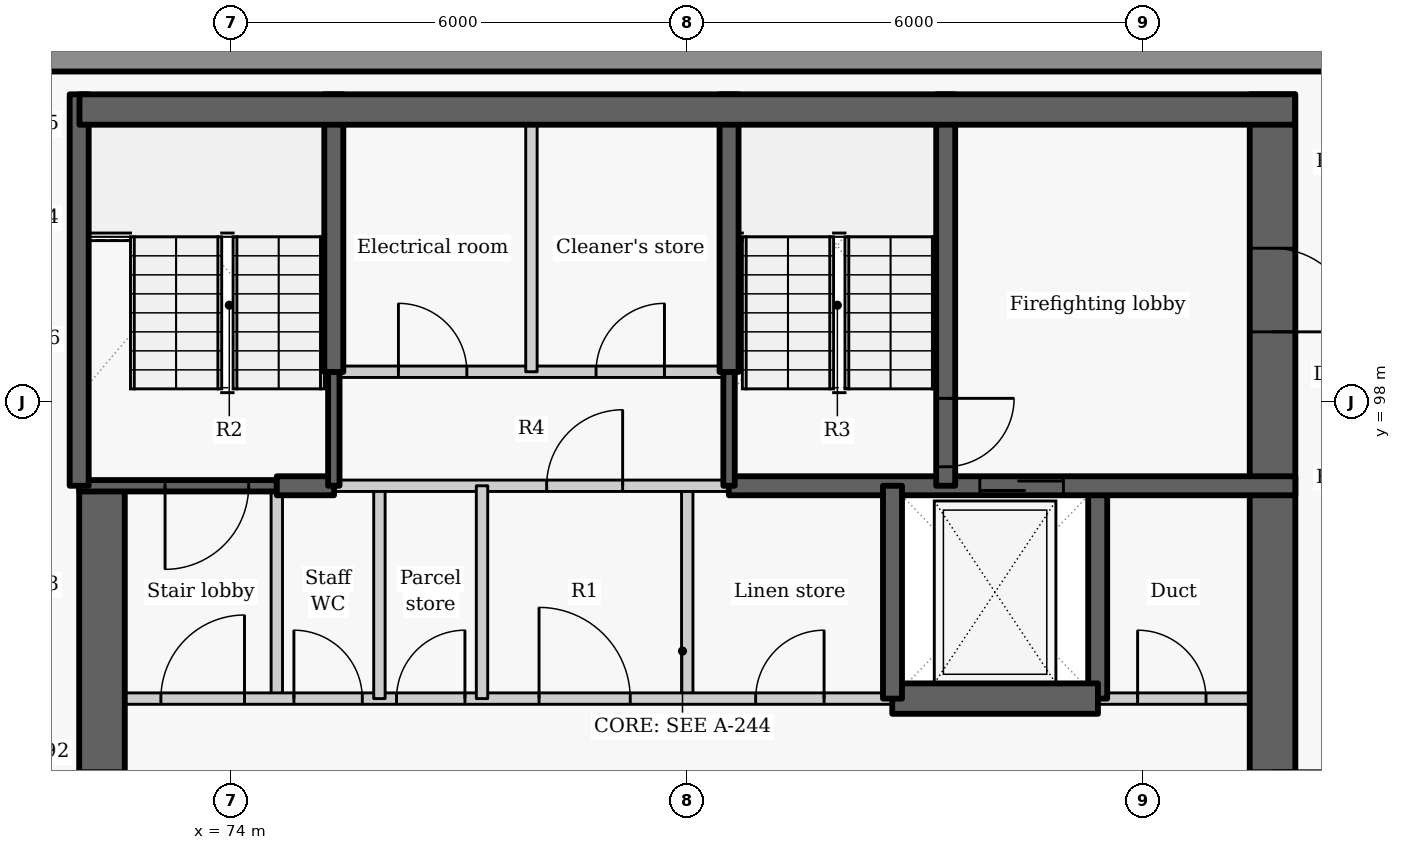
"""IFC4 building model, lengths in metres.
Left out: names, types, materials, properties, quantities, classifications, styles, units other than length and angle.
Written with IfcOpenShell. Run it as: python <this file> out.ifc"""

import sys

from ifc_helpers import new_model, si_unit, direction, frame, frame_2d, origin, place, context, subcontext, project, spatial, rectangle, extrude, element, fill, save


model = new_model("IFC4")
c1 = context("Model", 3, precision=1e-05, world=origin(), true_north=direction((0.0, 1.0)))
c2 = subcontext(c1, "Body", "Model", "MODEL_VIEW")
j1 = project(units=[si_unit("LENGTHUNIT", "METRE"), si_unit("PLANEANGLEUNIT", "RADIAN")], contexts=[c1])
p1 = place(None, origin())
s1 = spatial("IfcSite", under=j1, at=p1, CompositionType="ELEMENT")
p2 = place(p1, origin())
s2 = spatial("IfcBuilding", under=s1, at=p2, CompositionType="ELEMENT")
p3 = place(p2, frame((0.0, 0.0, 269.1)))
s3 = spatial("IfcBuildingStorey", under=s2, at=p3, CompositionType="ELEMENT", Elevation=269.1)
p4 = place(p3, frame((89.499, 102.5, 0.0), z_axis=(0.0, 0.0, 1.0), x_axis=(-1.0, 0.0, 0.0)))
e1 = element("IfcWall", 1, at=p4, inside=s3, PredefinedType="SOLIDWALL", context=c2, shape_type="SweptSolid", body=[
    extrude(rectangle(XDim=19.033, YDim=0.3, at=frame_2d((9.517, 0.0))), origin(), (0.0, 0.0, 1.0), 2.125),
])
p5 = place(p3, frame((74.6, 94.1, 0.0), z_axis=(0.0, 0.0, 1.0), x_axis=(0.0, 1.0, 0.0)))
e2 = element("IfcWall", 2, at=p5, inside=s3, PredefinedType="PARTITIONING", context=c2, shape_type="SweptSolid", body=[
    extrude(rectangle(XDim=2.8, YDim=0.15, at=frame_2d((1.4, 0.0))), origin(), (0.0, 0.0, 1.0), 3.025),
])
p6 = place(p3, frame((72.3, 87.8, -0.275), z_axis=(0.0, 0.0, 1.0), x_axis=(0.0, 1.0, 0.0)))
e3 = element("IfcWall", 3, at=p6, inside=s3, PredefinedType="SHEAR", context=c2, shape_type="SweptSolid", body=[
    extrude(rectangle(XDim=9.1, YDim=0.6, at=frame_2d((4.55, 0.0))), origin(), (0.0, 0.0, 1.0), 3.3),
])
p7 = place(p6, frame((3.85, 0.0, 0.275)))
e4 = element("IfcOpeningElement", 4, at=p7, cuts=e3, PredefinedType="OPENING", context=c2, shape_type="SweptSolid", body=[
    extrude(rectangle(XDim=1.5, YDim=2.1, at=frame_2d((0.75, 1.05))), frame((0.0, 0.31, 0.0), z_axis=(0.0, -1.0, 0.0), x_axis=(1.0, 0.0, 0.0)), (0.0, 0.0, 1.0), 0.62),
])
p8 = place(p3, frame((85.4, 94.1, -0.275), z_axis=(0.0, 0.0, 1.0), x_axis=(0.0, 1.0, 0.0)))
e5 = element("IfcWall", 5, at=p8, inside=s3, PredefinedType="SHEAR", context=c2, shape_type="SweptSolid", body=[
    extrude(rectangle(XDim=2.8, YDim=0.25, at=frame_2d((1.4, 0.0))), origin(), (0.0, 0.0, 1.0), 3.3),
])
p9 = place(p3, frame((87.7, 102.05, -0.275), z_axis=(0.0, 0.0, 1.0), x_axis=(0.0, -1.0, 0.0)))
e6 = element("IfcWall", 6, at=p9, inside=s3, PredefinedType="SHEAR", context=c2, shape_type="SweptSolid", body=[
    extrude(rectangle(XDim=14.25, YDim=0.6, at=frame_2d((7.125, 0.0))), origin(), (0.0, 0.0, 1.0), 3.3),
])
p10 = place(p9, frame((8.9, 0.0, 0.275)))
e7 = element("IfcOpeningElement", 7, at=p10, cuts=e6, PredefinedType="OPENING", context=c2, shape_type="SweptSolid", body=[
    extrude(rectangle(XDim=1.5, YDim=2.1, at=frame_2d((0.75, 1.05))), frame((0.0, 0.31, 0.0), z_axis=(0.0, -1.0, 0.0), x_axis=(1.0, 0.0, 0.0)), (0.0, 0.0, 1.0), 0.62),
])
p11 = place(p9, frame((2.025, 0.0, 0.275)))
e8 = element("IfcOpeningElement", 8, at=p11, cuts=e6, PredefinedType="OPENING", context=c2, shape_type="SweptSolid", body=[
    extrude(rectangle(XDim=1.1, YDim=2.1, at=frame_2d((0.55, 1.05))), frame((0.0, 0.31, 0.0), z_axis=(0.0, -1.0, 0.0), x_axis=(1.0, 0.0, 0.0)), (0.0, 0.0, 1.0), 0.62),
])
p12 = place(p3, frame((80.0, 94.1, 0.0), z_axis=(0.0, 0.0, 1.0), x_axis=(0.0, 1.0, 0.0)))
e9 = element("IfcWall", 9, at=p12, inside=s3, PredefinedType="PARTITIONING", context=c2, shape_type="SweptSolid", body=[
    extrude(rectangle(XDim=2.8, YDim=0.15, at=frame_2d((1.4, 0.0))), origin(), (0.0, 0.0, 1.0), 3.025),
])
p13 = place(p3, frame((72.0, 94.1, 0.0), z_axis=(0.0, 0.0, 1.0), x_axis=(1.0, 0.0, 0.0)))
e10 = element("IfcWall", 10, at=p13, inside=s3, PredefinedType="PARTITIONING", context=c2, shape_type="SweptSolid", body=[
    extrude(rectangle(XDim=10.703, YDim=0.15, at=frame_2d((5.352, 0.0))), origin(), (0.0, 0.0, 1.0), 3.025),
])
p14 = place(p13, frame((1.075, 0.0, 0.0)))
e11 = element("IfcOpeningElement", 11, at=p14, cuts=e10, PredefinedType="OPENING", context=c2, shape_type="SweptSolid", body=[
    extrude(rectangle(XDim=1.1, YDim=2.1, at=frame_2d((0.55, 1.05))), frame((0.0, 0.085, 0.0), z_axis=(0.0, -1.0, 0.0), x_axis=(1.0, 0.0, 0.0)), (0.0, 0.0, 1.0), 0.17),
])
p15 = place(p13, frame((2.825, 0.0, 0.0)))
e12 = element("IfcOpeningElement", 12, at=p15, cuts=e10, PredefinedType="OPENING", context=c2, shape_type="SweptSolid", body=[
    extrude(rectangle(XDim=0.9, YDim=2.1, at=frame_2d((0.45, 1.05))), frame((0.0, 0.085, 0.0), z_axis=(0.0, -1.0, 0.0), x_axis=(1.0, 0.0, 0.0)), (0.0, 0.0, 1.0), 0.17),
])
p16 = place(p13, frame((4.175, 0.0, 0.0)))
e13 = element("IfcOpeningElement", 13, at=p16, cuts=e10, PredefinedType="OPENING", context=c2, shape_type="SweptSolid", body=[
    extrude(rectangle(XDim=0.9, YDim=2.1, at=frame_2d((0.45, 1.05))), frame((0.0, 0.085, 0.0), z_axis=(0.0, -1.0, 0.0), x_axis=(1.0, 0.0, 0.0)), (0.0, 0.0, 1.0), 0.17),
])
p17 = place(p13, frame((6.05, 0.0, 0.0)))
e14 = element("IfcOpeningElement", 14, at=p17, cuts=e10, PredefinedType="OPENING", context=c2, shape_type="SweptSolid", body=[
    extrude(rectangle(XDim=1.2, YDim=2.1, at=frame_2d((0.6, 1.05))), frame((0.0, 0.085, 0.0), z_axis=(0.0, -1.0, 0.0), x_axis=(1.0, 0.0, 0.0)), (0.0, 0.0, 1.0), 0.17),
])
p18 = place(p13, frame((8.9, 0.0, 0.0)))
e15 = element("IfcOpeningElement", 15, at=p18, cuts=e10, PredefinedType="OPENING", context=c2, shape_type="SweptSolid", body=[
    extrude(rectangle(XDim=0.9, YDim=2.1, at=frame_2d((0.45, 1.05))), frame((0.0, 0.085, 0.0), z_axis=(0.0, -1.0, 0.0), x_axis=(1.0, 0.0, 0.0)), (0.0, 0.0, 1.0), 0.17),
])
p19 = place(p3, frame((85.397, 94.1, 0.0), z_axis=(0.0, 0.0, 1.0), x_axis=(1.0, 0.0, 0.0)))
e16 = element("IfcWall", 16, at=p19, inside=s3, PredefinedType="PARTITIONING", context=c2, shape_type="SweptSolid", body=[
    extrude(rectangle(XDim=2.603, YDim=0.15, at=frame_2d((1.302, 0.0))), origin(), (0.0, 0.0, 1.0), 3.025),
])
p20 = place(p19, frame((0.528, 0.0, 0.0)))
e17 = element("IfcOpeningElement", 17, at=p20, cuts=e16, PredefinedType="OPENING", context=c2, shape_type="SweptSolid", body=[
    extrude(rectangle(XDim=0.9, YDim=2.1, at=frame_2d((0.45, 1.05))), frame((0.0, 0.085, 0.0), z_axis=(0.0, -1.0, 0.0), x_axis=(1.0, 0.0, 0.0)), (0.0, 0.0, 1.0), 0.17),
])
p21 = place(p3, frame((82.697, 94.1, -0.275), z_axis=(0.0, 0.0, 1.0), x_axis=(1.0, 0.0, 0.0)))
e18 = element("IfcWall", 18, at=p21, inside=s3, PredefinedType="SHEAR", context=c2, shape_type="SweptSolid", body=[
    extrude(rectangle(XDim=2.706, YDim=0.4, at=frame_2d((1.353, 0.0))), origin(), (0.0, 0.0, 1.0), 3.3),
])
p22 = place(p3, frame((74.6, 96.9, -0.275), z_axis=(0.0, 0.0, 1.0), x_axis=(-1.0, 0.0, 0.0)))
e19 = element("IfcWall", 19, at=p22, inside=s3, PredefinedType="SHEAR", context=c2, shape_type="SweptSolid", body=[
    extrude(rectangle(XDim=2.6, YDim=0.15, at=frame_2d((1.3, 0.0))), origin(), (0.0, 0.0, 1.0), 3.3),
])
p23 = place(p22, frame((0.37, 0.0, 0.275)))
e20 = element("IfcOpeningElement", 20, at=p23, cuts=e19, PredefinedType="OPENING", context=c2, shape_type="SweptSolid", body=[
    extrude(rectangle(XDim=1.1, YDim=2.1, at=frame_2d((0.55, 1.05))), frame((0.0, 0.085, 0.0), z_axis=(0.0, -1.0, 0.0), x_axis=(1.0, 0.0, 0.0)), (0.0, 0.0, 1.0), 0.17),
])
p24 = place(p3, frame((75.95, 94.1, 0.0), z_axis=(0.0, 0.0, 1.0), x_axis=(0.0, 1.0, 0.0)))
e21 = element("IfcWall", 21, at=p24, inside=s3, PredefinedType="PARTITIONING", context=c2, shape_type="SweptSolid", body=[
    extrude(rectangle(XDim=2.8, YDim=0.15, at=frame_2d((1.4, 0.0))), origin(), (0.0, 0.0, 1.0), 3.025),
])
p25 = place(p3, frame((74.6, 96.9, -0.275), z_axis=(0.0, 0.0, 1.0), x_axis=(1.0, 0.0, 0.0)))
e22 = element("IfcWall", 22, at=p25, inside=s3, PredefinedType="SHEAR", context=c2, shape_type="SweptSolid", body=[
    extrude(rectangle(XDim=0.753, YDim=0.25, at=frame_2d((0.376, 0.0))), origin(), (0.0, 0.0, 1.0), 3.3),
])
p26 = place(p3, frame((80.547, 96.9, -0.275), z_axis=(0.0, 0.0, 1.0), x_axis=(1.0, 0.0, 0.0)))
e23 = element("IfcWall", 23, at=p26, inside=s3, PredefinedType="SHEAR", context=c2, shape_type="SweptSolid", body=[
    extrude(rectangle(XDim=7.453, YDim=0.25, at=frame_2d((3.727, 0.0))), origin(), (0.0, 0.0, 1.0), 3.3),
])
p27 = place(p26, frame((3.302, 0.0, 0.275)))
e24 = element("IfcOpeningElement", 24, at=p27, cuts=e23, PredefinedType="OPENING", context=c2, shape_type="SweptSolid", body=[
    extrude(rectangle(XDim=1.1, YDim=2.1, at=frame_2d((0.55, 1.05))), frame((0.0, 0.135, 0.0), z_axis=(0.0, -1.0, 0.0), x_axis=(1.0, 0.0, 0.0)), (0.0, 0.0, 1.0), 0.27),
])
p28 = place(p3, frame((75.347, 96.9, 0.0), z_axis=(0.0, 0.0, 1.0), x_axis=(1.0, 0.0, 0.0)))
e25 = element("IfcWall", 25, at=p28, inside=s3, PredefinedType="PARTITIONING", context=c2, shape_type="SweptSolid", body=[
    extrude(rectangle(XDim=5.206, YDim=0.15, at=frame_2d((2.603, 0.0))), origin(), (0.0, 0.0, 1.0), 3.025),
])
p29 = place(p28, frame((2.803, 0.0, 0.0)))
e26 = element("IfcOpeningElement", 26, at=p29, cuts=e25, PredefinedType="OPENING", context=c2, shape_type="SweptSolid", body=[
    extrude(rectangle(XDim=1.0, YDim=2.1, at=frame_2d((0.5, 1.05))), frame((0.0, 0.085, 0.0), z_axis=(0.0, -1.0, 0.0), x_axis=(1.0, 0.0, 0.0)), (0.0, 0.0, 1.0), 0.17),
])
p30 = place(p3, frame((77.3, 94.1, 0.0), z_axis=(0.0, 0.0, 1.0), x_axis=(0.0, 1.0, 0.0)))
e27 = element("IfcWall", 27, at=p30, inside=s3, PredefinedType="PARTITIONING", context=c2, shape_type="SweptSolid", body=[
    extrude(rectangle(XDim=2.8, YDim=0.15, at=frame_2d((1.4, 0.0))), origin(), (0.0, 0.0, 1.0), 3.025),
])
p31 = place(p3, frame((82.7, 94.1, -0.275), z_axis=(0.0, 0.0, 1.0), x_axis=(0.0, 1.0, 0.0)))
e28 = element("IfcWall", 28, at=p31, inside=s3, PredefinedType="SHEAR", context=c2, shape_type="SweptSolid", body=[
    extrude(rectangle(XDim=2.8, YDim=0.25, at=frame_2d((1.4, 0.0))), origin(), (0.0, 0.0, 1.0), 3.3),
])
p32 = place(p3, frame((75.35, 96.9, -0.275), z_axis=(0.0, 0.0, 1.0), x_axis=(0.0, 1.0, 0.0)))
e29 = element("IfcWall", 29, at=p32, inside=s3, PredefinedType="SHEAR", context=c2, shape_type="SweptSolid", body=[
    extrude(rectangle(XDim=1.503, YDim=0.15, at=frame_2d((0.751, 0.0))), origin(), (0.0, 0.0, 1.0), 3.3),
])
p33 = place(p3, frame((75.35, 98.397, -0.275), z_axis=(0.0, 0.0, 1.0), x_axis=(0.0, 1.0, 0.0)))
e30 = element("IfcWall", 30, at=p33, inside=s3, PredefinedType="SHEAR", context=c2, shape_type="SweptSolid", body=[
    extrude(rectangle(XDim=3.653, YDim=0.25, at=frame_2d((1.827, 0.0))), origin(), (0.0, 0.0, 1.0), 3.3),
])
p34 = place(p3, frame((72.0, 96.9, -0.275), z_axis=(0.0, 0.0, 1.0), x_axis=(0.0, 1.0, 0.0)))
e31 = element("IfcWall", 31, at=p34, inside=s3, PredefinedType="SHEAR", context=c2, shape_type="SweptSolid", body=[
    extrude(rectangle(XDim=5.15, YDim=0.25, at=frame_2d((2.575, 0.0))), origin(), (0.0, 0.0, 1.0), 3.3),
])
p35 = place(p3, frame((83.4, 102.05, -0.275), z_axis=(0.0, 0.0, 1.0), x_axis=(0.0, -1.0, 0.0)))
e32 = element("IfcWall", 32, at=p35, inside=s3, PredefinedType="SHEAR", context=c2, shape_type="SweptSolid", body=[
    extrude(rectangle(XDim=5.15, YDim=0.25, at=frame_2d((2.575, 0.0))), origin(), (0.0, 0.0, 1.0), 3.3),
])
p36 = place(p35, frame((4.0, 0.0, 0.275)))
e33 = element("IfcOpeningElement", 33, at=p36, cuts=e32, PredefinedType="OPENING", context=c2, shape_type="SweptSolid", body=[
    extrude(rectangle(XDim=0.9, YDim=2.1, at=frame_2d((0.45, 1.05))), frame((0.0, 0.135, 0.0), z_axis=(0.0, -1.0, 0.0), x_axis=(1.0, 0.0, 0.0)), (0.0, 0.0, 1.0), 0.27),
])
p37 = place(p3, frame((80.55, 96.9, -0.275), z_axis=(0.0, 0.0, 1.0), x_axis=(0.0, 1.0, 0.0)))
e34 = element("IfcWall", 34, at=p37, inside=s3, PredefinedType="SHEAR", context=c2, shape_type="SweptSolid", body=[
    extrude(rectangle(XDim=1.503, YDim=0.15, at=frame_2d((0.751, 0.0))), origin(), (0.0, 0.0, 1.0), 3.3),
])
p38 = place(p3, frame((80.55, 98.397, -0.275), z_axis=(0.0, 0.0, 1.0), x_axis=(0.0, 1.0, 0.0)))
e35 = element("IfcWall", 35, at=p38, inside=s3, PredefinedType="SHEAR", context=c2, shape_type="SweptSolid", body=[
    extrude(rectangle(XDim=3.653, YDim=0.25, at=frame_2d((1.827, 0.0))), origin(), (0.0, 0.0, 1.0), 3.3),
])
p39 = place(p3, frame((75.35, 98.4, 0.0), z_axis=(0.0, 0.0, 1.0), x_axis=(1.0, 0.0, 0.0)))
e36 = element("IfcWall", 36, at=p39, inside=s3, PredefinedType="PARTITIONING", context=c2, shape_type="SweptSolid", body=[
    extrude(rectangle(XDim=5.2, YDim=0.15, at=frame_2d((2.6, 0.0))), origin(), (0.0, 0.0, 1.0), 3.025),
])
p40 = place(p39, frame((0.85, 0.0, 0.0)))
e37 = element("IfcOpeningElement", 37, at=p40, cuts=e36, PredefinedType="OPENING", context=c2, shape_type="SweptSolid", body=[
    extrude(rectangle(XDim=0.9, YDim=2.1, at=frame_2d((0.45, 1.05))), frame((0.0, 0.085, 0.0), z_axis=(0.0, -1.0, 0.0), x_axis=(1.0, 0.0, 0.0)), (0.0, 0.0, 1.0), 0.17),
])
p41 = place(p39, frame((3.45, 0.0, 0.0)))
e38 = element("IfcOpeningElement", 38, at=p41, cuts=e36, PredefinedType="OPENING", context=c2, shape_type="SweptSolid", body=[
    extrude(rectangle(XDim=0.9, YDim=2.1, at=frame_2d((0.45, 1.05))), frame((0.0, 0.085, 0.0), z_axis=(0.0, -1.0, 0.0), x_axis=(1.0, 0.0, 0.0)), (0.0, 0.0, 1.0), 0.17),
])
p42 = place(p3, frame((77.95, 98.4, 0.0), z_axis=(0.0, 0.0, 1.0), x_axis=(0.0, 1.0, 0.0)))
e39 = element("IfcWall", 39, at=p42, inside=s3, PredefinedType="PARTITIONING", context=c2, shape_type="SweptSolid", body=[
    extrude(rectangle(XDim=3.65, YDim=0.15, at=frame_2d((1.825, 0.0))), origin(), (0.0, 0.0, 1.0), 3.025),
])
p43 = place(p3, frame((72.004, 101.85, -0.275), z_axis=(0.0, 0.0, 1.0), x_axis=(1.0, 0.0, 0.0)))
e40 = element("IfcWall", 40, at=p43, inside=s3, PredefinedType="SHEAR", context=c2, shape_type="SweptSolid", body=[
    extrude(rectangle(XDim=15.992, YDim=0.4, at=frame_2d((7.996, 0.0))), origin(), (0.0, 0.0, 1.0), 3.3),
])
p44 = place(p14, origin())
e41 = element("IfcDoor", 41, at=p44, inside=s3, OperationType="SINGLE_SWING_RIGHT", PredefinedType="DOOR", context=c2, shape_type="SweptSolid", body=[
    extrude(rectangle(XDim=1.1, YDim=2.1, at=frame_2d((0.55, 1.05))), frame((0.0, 0.025, 0.0), z_axis=(0.0, -1.0, 0.0), x_axis=(1.0, 0.0, 0.0)), (0.0, 0.0, 1.0), 0.05),
])
fill(e11, e41)
p45 = place(p15, origin())
e42 = element("IfcDoor", 42, at=p45, inside=s3, OperationType="SINGLE_SWING_LEFT", PredefinedType="DOOR", context=c2, shape_type="SweptSolid", body=[
    extrude(rectangle(XDim=0.9, YDim=2.1, at=frame_2d((0.45, 1.05))), frame((0.0, 0.025, 0.0), z_axis=(0.0, -1.0, 0.0), x_axis=(1.0, 0.0, 0.0)), (0.0, 0.0, 1.0), 0.05),
])
fill(e12, e42)
p46 = place(p16, origin())
e43 = element("IfcDoor", 43, at=p46, inside=s3, OperationType="SINGLE_SWING_RIGHT", PredefinedType="DOOR", context=c2, shape_type="SweptSolid", body=[
    extrude(rectangle(XDim=0.9, YDim=2.1, at=frame_2d((0.45, 1.05))), frame((0.0, 0.025, 0.0), z_axis=(0.0, -1.0, 0.0), x_axis=(1.0, 0.0, 0.0)), (0.0, 0.0, 1.0), 0.05),
])
fill(e13, e43)
p47 = place(p17, origin())
e44 = element("IfcDoor", 44, at=p47, inside=s3, OperationType="DOUBLE_DOOR_SINGLE_SWING", PredefinedType="DOOR", context=c2, shape_type="SweptSolid", body=[
    extrude(rectangle(XDim=1.2, YDim=2.1, at=frame_2d((0.6, 1.05))), frame((0.0, 0.025, 0.0), z_axis=(0.0, -1.0, 0.0), x_axis=(1.0, 0.0, 0.0)), (0.0, 0.0, 1.0), 0.05),
])
fill(e14, e44)
p48 = place(p18, origin())
e45 = element("IfcDoor", 45, at=p48, inside=s3, OperationType="SINGLE_SWING_RIGHT", PredefinedType="DOOR", context=c2, shape_type="SweptSolid", body=[
    extrude(rectangle(XDim=0.9, YDim=2.1, at=frame_2d((0.45, 1.05))), frame((0.0, 0.025, 0.0), z_axis=(0.0, -1.0, 0.0), x_axis=(1.0, 0.0, 0.0)), (0.0, 0.0, 1.0), 0.05),
])
fill(e15, e45)
p49 = place(p27, origin())
e46 = element("IfcDoor", 46, at=p49, inside=s3, OperationType="SLIDING_TO_LEFT", PredefinedType="DOOR", context=c2, shape_type="SweptSolid", body=[
    extrude(rectangle(XDim=1.1, YDim=2.1, at=frame_2d((0.55, 1.05))), frame((0.0, 0.025, 0.0), z_axis=(0.0, -1.0, 0.0), x_axis=(1.0, 0.0, 0.0)), (0.0, 0.0, 1.0), 0.05),
])
fill(e24, e46)
p50 = place(p20, origin())
e47 = element("IfcDoor", 47, at=p50, inside=s3, OperationType="SINGLE_SWING_LEFT", PredefinedType="DOOR", context=c2, shape_type="SweptSolid", body=[
    extrude(rectangle(XDim=0.9, YDim=2.1, at=frame_2d((0.45, 1.05))), frame((0.0, 0.025, 0.0), z_axis=(0.0, -1.0, 0.0), x_axis=(1.0, 0.0, 0.0)), (0.0, 0.0, 1.0), 0.05),
])
fill(e17, e47)
p51 = place(p29, origin())
e48 = element("IfcDoor", 48, at=p51, inside=s3, OperationType="SINGLE_SWING_RIGHT", PredefinedType="DOOR", context=c2, shape_type="SweptSolid", body=[
    extrude(rectangle(XDim=1.0, YDim=2.1, at=frame_2d((0.5, 1.05))), frame((0.0, 0.025, 0.0), z_axis=(0.0, -1.0, 0.0), x_axis=(1.0, 0.0, 0.0)), (0.0, 0.0, 1.0), 0.05),
])
fill(e26, e48)
p52 = place(p40, origin())
e49 = element("IfcDoor", 49, at=p52, inside=s3, OperationType="SINGLE_SWING_LEFT", PredefinedType="DOOR", context=c2, shape_type="SweptSolid", body=[
    extrude(rectangle(XDim=0.9, YDim=2.1, at=frame_2d((0.45, 1.05))), frame((0.0, 0.025, 0.0), z_axis=(0.0, -1.0, 0.0), x_axis=(1.0, 0.0, 0.0)), (0.0, 0.0, 1.0), 0.05),
])
fill(e37, e49)
p53 = place(p41, origin())
e50 = element("IfcDoor", 50, at=p53, inside=s3, OperationType="SINGLE_SWING_RIGHT", PredefinedType="DOOR", context=c2, shape_type="SweptSolid", body=[
    extrude(rectangle(XDim=0.9, YDim=2.1, at=frame_2d((0.45, 1.05))), frame((0.0, 0.025, 0.0), z_axis=(0.0, -1.0, 0.0), x_axis=(1.0, 0.0, 0.0)), (0.0, 0.0, 1.0), 0.05),
])
fill(e38, e50)
p54 = place(p23, origin())
e51 = element("IfcDoor", 51, at=p54, inside=s3, OperationType="SINGLE_SWING_RIGHT", PredefinedType="DOOR", context=c2, shape_type="SweptSolid", body=[
    extrude(rectangle(XDim=1.1, YDim=2.1, at=frame_2d((0.55, 1.05))), frame((0.0, 0.025, 0.0), z_axis=(0.0, -1.0, 0.0), x_axis=(1.0, 0.0, 0.0)), (0.0, 0.0, 1.0), 0.05),
])
fill(e20, e51)
p55 = place(p36, origin())
e52 = element("IfcDoor", 52, at=p55, inside=s3, OperationType="SINGLE_SWING_LEFT", PredefinedType="DOOR", context=c2, shape_type="SweptSolid", body=[
    extrude(rectangle(XDim=0.9, YDim=2.1, at=frame_2d((0.45, 1.05))), frame((0.0, 0.025, 0.0), z_axis=(0.0, -1.0, 0.0), x_axis=(1.0, 0.0, 0.0)), (0.0, 0.0, 1.0), 0.05),
])
fill(e33, e52)
p56 = place(p10, origin())
e53 = element("IfcDoor", 53, at=p56, inside=s3, OperationType="DOUBLE_DOOR_SINGLE_SWING", PredefinedType="DOOR", context=c2, shape_type="SweptSolid", body=[
    extrude(rectangle(XDim=1.5, YDim=2.1, at=frame_2d((0.75, 1.05))), frame((0.0, 0.025, 0.0), z_axis=(0.0, -1.0, 0.0), x_axis=(1.0, 0.0, 0.0)), (0.0, 0.0, 1.0), 0.05),
])
fill(e7, e53)
p57 = place(p7, origin())
e54 = element("IfcDoor", 54, at=p57, inside=s3, OperationType="DOUBLE_DOOR_SINGLE_SWING", PredefinedType="DOOR", context=c2, shape_type="SweptSolid", body=[
    extrude(rectangle(XDim=1.5, YDim=2.1, at=frame_2d((0.75, 1.05))), frame((0.0, 0.025, 0.0), z_axis=(0.0, -1.0, 0.0), x_axis=(1.0, 0.0, 0.0)), (0.0, 0.0, 1.0), 0.05),
])
fill(e4, e54)
p58 = place(p11, origin())
e55 = element("IfcDoor", 55, at=p58, inside=s3, OperationType="SINGLE_SWING_RIGHT", PredefinedType="DOOR", context=c2, shape_type="SweptSolid", body=[
    extrude(rectangle(XDim=1.1, YDim=2.1, at=frame_2d((0.55, 1.05))), frame((0.0, 0.025, 0.0), z_axis=(0.0, -1.0, 0.0), x_axis=(1.0, 0.0, 0.0)), (0.0, 0.0, 1.0), 0.05),
])
fill(e8, e55)
save(model, sys.argv[1])
